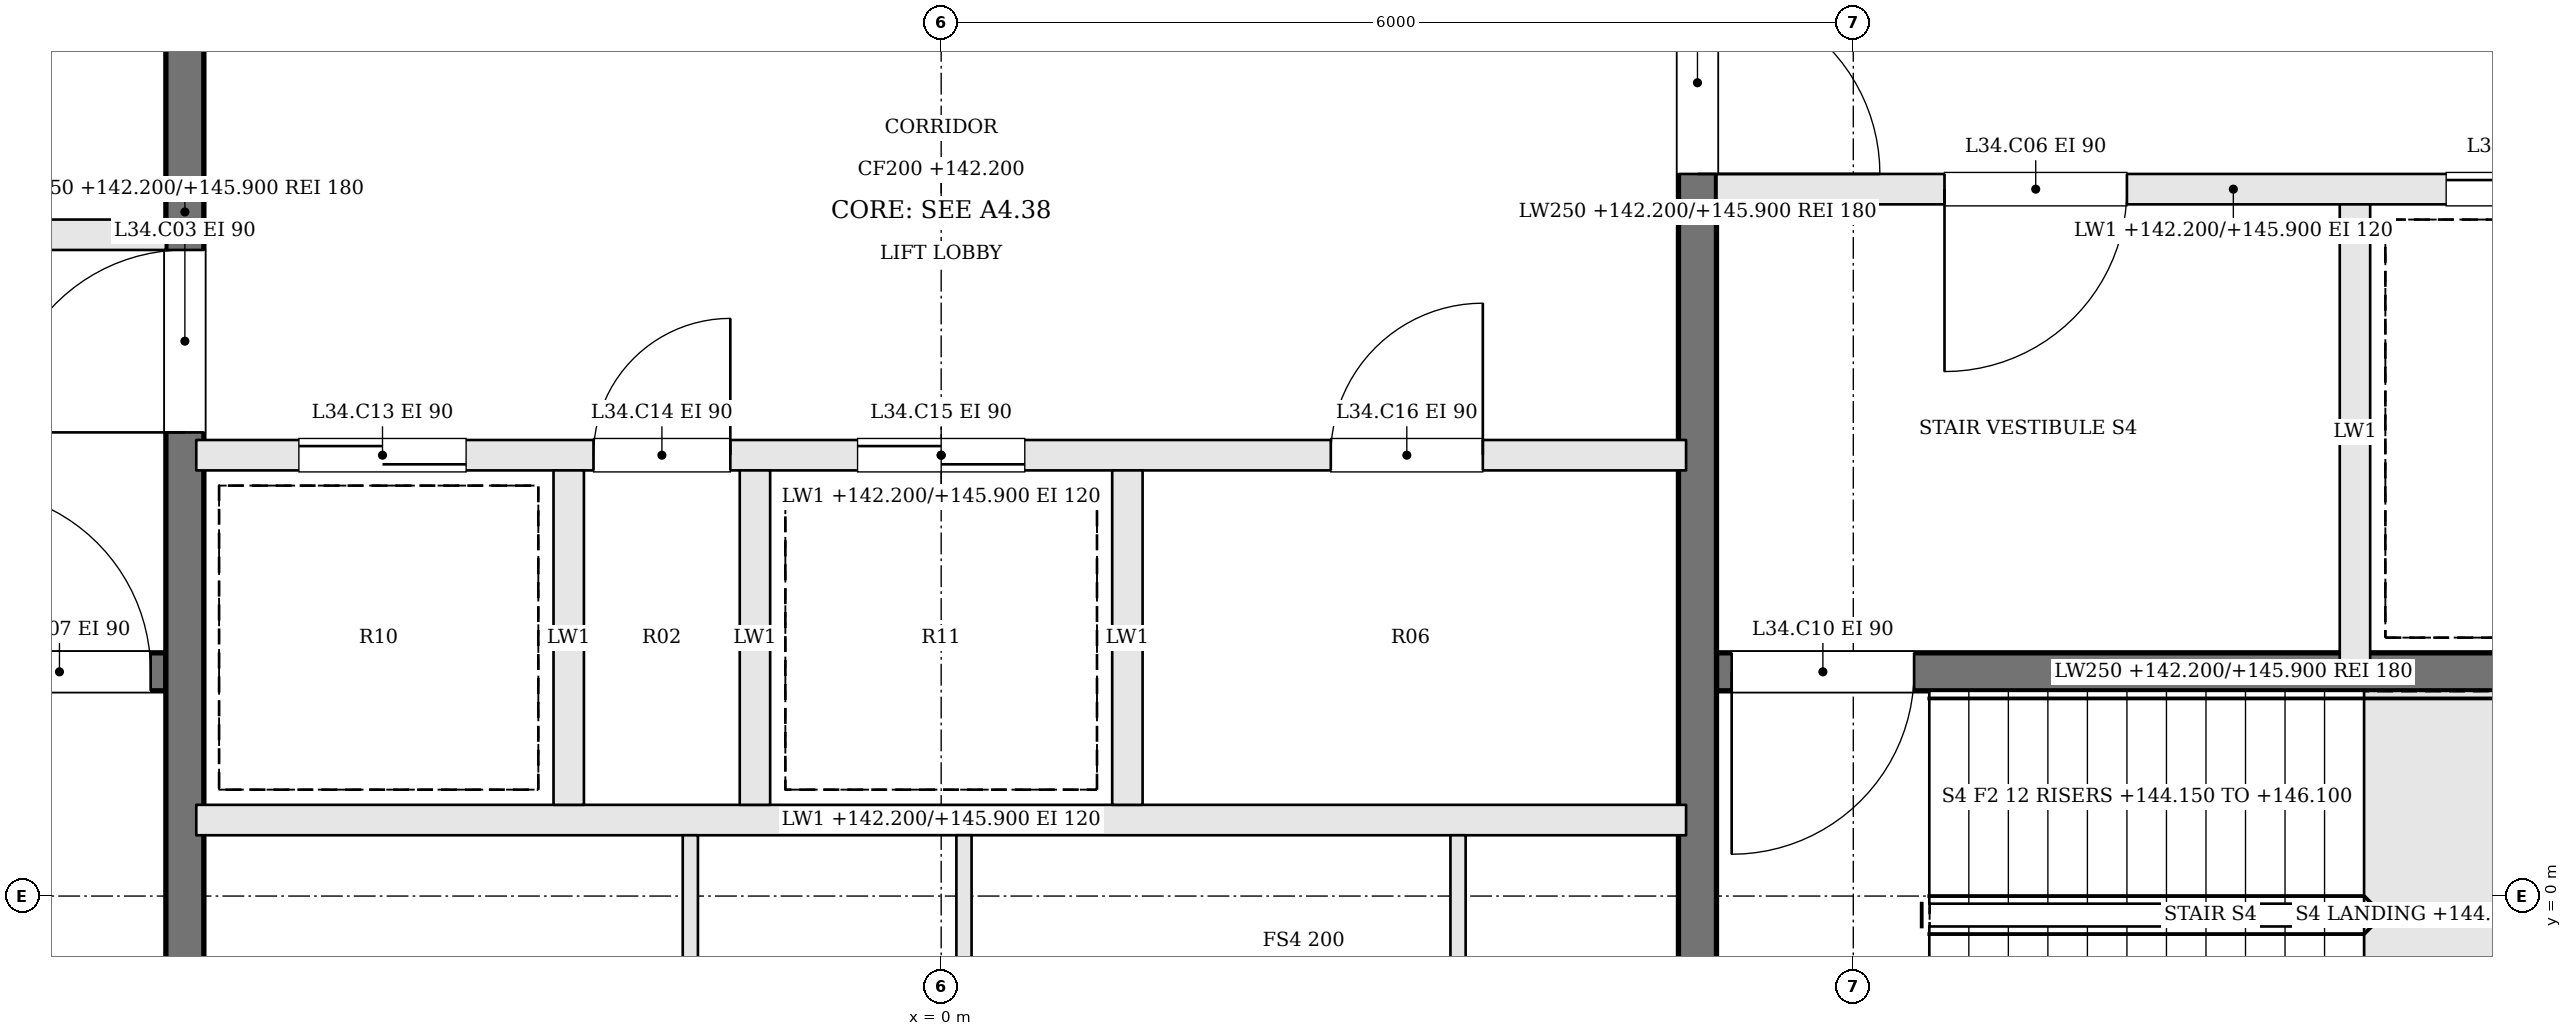
"""IFC4 building model, lengths in metres.
Left out: names, types, materials, properties, quantities, classifications, styles, units other than length and angle.
Written with IfcOpenShell. Run it as: python <this file> out.ifc"""

import sys

from ifc_helpers import new_model, si_unit, direction, frame, frame_2d, origin, place, context, subcontext, project, spatial, rectangle, extrude, element, fill, save


model = new_model("IFC4")
c1 = context("Model", 3, precision=1e-05, world=origin(), true_north=direction((0.0, 1.0)))
c2 = subcontext(c1, "Body", "Model", "MODEL_VIEW")
j1 = project(units=[si_unit("LENGTHUNIT", "METRE"), si_unit("PLANEANGLEUNIT", "RADIAN")], contexts=[c1])
p1 = place(None, origin())
s1 = spatial("IfcSite", under=j1, at=p1, CompositionType="ELEMENT")
p2 = place(p1, origin())
s2 = spatial("IfcBuilding", under=s1, at=p2, CompositionType="ELEMENT")
p3 = place(p2, frame((0.0, 0.0, 142.2)))
s3 = spatial("IfcBuildingStorey", under=s2, at=p3, CompositionType="ELEMENT", Elevation=142.2)
p4 = place(p3, frame((-11.9, 1.475, 0.0), z_axis=(0.0, 0.0, 1.0), x_axis=(1.0, 0.0, 0.0)))
e1 = element("IfcWall", 1, at=p4, inside=s3, PredefinedType="SOLIDWALL", context=c2, shape_type="SweptSolid", body=[
    extrude(rectangle(XDim=6.8, YDim=0.25, at=frame_2d((3.4, 0.0))), origin(), (0.0, 0.0, 1.0), 3.7),
])
p5 = place(p4, frame((5.5, 0.0, 0.0)))
e2 = element("IfcOpeningElement", 2, at=p5, cuts=e1, PredefinedType="OPENING", context=c2, shape_type="SweptSolid", body=[
    extrude(rectangle(XDim=1.2, YDim=2.1, at=frame_2d((0.6, 1.05))), frame((0.0, 0.135, 0.0), z_axis=(0.0, -1.0, 0.0), x_axis=(1.0, 0.0, 0.0)), (0.0, 0.0, 1.0), 0.27),
])
p6 = place(p3, frame((-11.9, 4.35, 0.0), z_axis=(0.0, 0.0, 1.0), x_axis=(1.0, 0.0, 0.0)))
e3 = element("IfcWall", 3, at=p6, inside=s3, PredefinedType="SOLIDWALL", context=c2, shape_type="SweptSolid", body=[
    extrude(rectangle(XDim=6.8, YDim=0.2, at=frame_2d((3.4, 0.0))), origin(), (0.0, 0.0, 1.0), 3.7),
])
p7 = place(p6, frame((4.1, 0.0, 0.0)))
e4 = element("IfcOpeningElement", 4, at=p7, cuts=e3, PredefinedType="OPENING", context=c2, shape_type="SweptSolid", body=[
    extrude(rectangle(XDim=1.2, YDim=2.1, at=frame_2d((0.6, 1.05))), frame((0.0, 0.11, 0.0), z_axis=(0.0, -1.0, 0.0), x_axis=(1.0, 0.0, 0.0)), (0.0, 0.0, 1.0), 0.22),
])
p8 = place(p6, frame((0.8, 0.0, 0.0)))
e5 = element("IfcOpeningElement", 5, at=p8, cuts=e3, PredefinedType="OPENING", context=c2, shape_type="SweptSolid", body=[
    extrude(rectangle(XDim=1.2, YDim=2.1, at=frame_2d((0.6, 1.05))), frame((0.0, 0.11, 0.0), z_axis=(0.0, -1.0, 0.0), x_axis=(1.0, 0.0, 0.0)), (0.0, 0.0, 1.0), 0.22),
])
p9 = place(p3, frame((11.9, 4.65, 0.0), z_axis=(0.0, 0.0, 1.0), x_axis=(-1.0, 0.0, 0.0)))
e6 = element("IfcWall", 6, at=p9, inside=s3, PredefinedType="SOLIDWALL", context=c2, shape_type="SweptSolid", body=[
    extrude(rectangle(XDim=6.8, YDim=0.2, at=frame_2d((3.4, 0.0))), origin(), (0.0, 0.0, 1.0), 3.7),
])
p10 = place(p9, frame((4.1, 0.0, 0.0)))
e7 = element("IfcOpeningElement", 7, at=p10, cuts=e6, PredefinedType="OPENING", context=c2, shape_type="SweptSolid", body=[
    extrude(rectangle(XDim=1.2, YDim=2.1, at=frame_2d((0.6, 1.05))), frame((0.0, 0.11, 0.0), z_axis=(0.0, -1.0, 0.0), x_axis=(1.0, 0.0, 0.0)), (0.0, 0.0, 1.0), 0.22),
])
p11 = place(p9, frame((0.8, 0.0, 0.0)))
e8 = element("IfcOpeningElement", 8, at=p11, cuts=e6, PredefinedType="OPENING", context=c2, shape_type="SweptSolid", body=[
    extrude(rectangle(XDim=1.2, YDim=2.1, at=frame_2d((0.6, 1.05))), frame((0.0, 0.11, 0.0), z_axis=(0.0, -1.0, 0.0), x_axis=(1.0, 0.0, 0.0)), (0.0, 0.0, 1.0), 0.22),
])
p12 = place(p3, frame((11.9, 1.475, 0.0), z_axis=(0.0, 0.0, 1.0), x_axis=(-1.0, 0.0, 0.0)))
e9 = element("IfcWall", 9, at=p12, inside=s3, PredefinedType="SOLIDWALL", context=c2, shape_type="SweptSolid", body=[
    extrude(rectangle(XDim=6.8, YDim=0.25, at=frame_2d((3.4, 0.0))), origin(), (0.0, 0.0, 1.0), 3.7),
])
p13 = place(p12, frame((5.5, 0.0, 0.0)))
e10 = element("IfcOpeningElement", 10, at=p13, cuts=e9, PredefinedType="OPENING", context=c2, shape_type="SweptSolid", body=[
    extrude(rectangle(XDim=1.2, YDim=2.1, at=frame_2d((0.6, 1.05))), frame((0.0, 0.135, 0.0), z_axis=(0.0, -1.0, 0.0), x_axis=(1.0, 0.0, 0.0)), (0.0, 0.0, 1.0), 0.27),
])
p14 = place(p3, frame((9.3, 4.55, 0.0), z_axis=(0.0, 0.0, 1.0), x_axis=(0.0, -1.0, 0.0)))
e11 = element("IfcWall", 11, at=p14, inside=s3, PredefinedType="SOLIDWALL", context=c2, shape_type="SweptSolid", body=[
    extrude(rectangle(XDim=3.0, YDim=0.2, at=frame_2d((1.5, 0.0))), origin(), (0.0, 0.0, 1.0), 3.7),
])
p15 = place(p3, frame((-4.975, -1.9, 0.0), z_axis=(0.0, 0.0, 1.0), x_axis=(0.0, 1.0, 0.0)))
e12 = element("IfcWall", 12, at=p15, inside=s3, PredefinedType="SOLIDWALL", context=c2, shape_type="SweptSolid", body=[
    extrude(rectangle(XDim=12.8, YDim=0.25, at=frame_2d((6.4, 0.0))), origin(), (0.0, 0.0, 1.0), 3.7),
])
p16 = place(p15, frame((4.95, 0.0, 0.0)))
e13 = element("IfcOpeningElement", 13, at=p16, cuts=e12, PredefinedType="OPENING", context=c2, shape_type="SweptSolid", body=[
    extrude(rectangle(XDim=1.2, YDim=2.1, at=frame_2d((0.6, 1.05))), frame((0.0, 0.135, 0.0), z_axis=(0.0, -1.0, 0.0), x_axis=(1.0, 0.0, 0.0)), (0.0, 0.0, 1.0), 0.27),
])
p17 = place(p3, frame((4.975, 10.9, 0.0), z_axis=(0.0, 0.0, 1.0), x_axis=(0.0, -1.0, 0.0)))
e14 = element("IfcWall", 14, at=p17, inside=s3, PredefinedType="SOLIDWALL", context=c2, shape_type="SweptSolid", body=[
    extrude(rectangle(XDim=12.8, YDim=0.25, at=frame_2d((6.4, 0.0))), origin(), (0.0, 0.0, 1.0), 3.7),
])
p18 = place(p17, frame((4.95, 0.0, 0.0)))
e15 = element("IfcOpeningElement", 15, at=p18, cuts=e14, PredefinedType="OPENING", context=c2, shape_type="SweptSolid", body=[
    extrude(rectangle(XDim=1.2, YDim=2.1, at=frame_2d((0.6, 1.05))), frame((0.0, 0.135, 0.0), z_axis=(0.0, -1.0, 0.0), x_axis=(1.0, 0.0, 0.0)), (0.0, 0.0, 1.0), 0.27),
])
p19 = place(p3, frame((-4.9, 0.5, 0.0), z_axis=(0.0, 0.0, 1.0), x_axis=(1.0, 0.0, 0.0)))
e16 = element("IfcWall", 16, at=p19, inside=s3, PredefinedType="SOLIDWALL", context=c2, shape_type="SweptSolid", body=[
    extrude(rectangle(XDim=9.8, YDim=0.2, at=frame_2d((4.9, 0.0))), origin(), (0.0, 0.0, 1.0), 3.7),
])
p20 = place(p3, frame((-4.9, 2.9, 0.0), z_axis=(0.0, 0.0, 1.0), x_axis=(1.0, 0.0, 0.0)))
e17 = element("IfcWall", 17, at=p20, inside=s3, PredefinedType="SOLIDWALL", context=c2, shape_type="SweptSolid", body=[
    extrude(rectangle(XDim=9.8, YDim=0.2, at=frame_2d((4.9, 0.0))), origin(), (0.0, 0.0, 1.0), 3.7),
])
p21 = place(p20, frame((0.675, 0.0, 0.0)))
e18 = element("IfcOpeningElement", 18, at=p21, cuts=e17, PredefinedType="OPENING", context=c2, shape_type="SweptSolid", body=[
    extrude(rectangle(XDim=1.1, YDim=2.1, at=frame_2d((0.55, 1.05))), frame((0.0, 0.11, 0.0), z_axis=(0.0, -1.0, 0.0), x_axis=(1.0, 0.0, 0.0)), (0.0, 0.0, 1.0), 0.22),
])
p22 = place(p20, frame((2.613, 0.0, 0.0)))
e19 = element("IfcOpeningElement", 19, at=p22, cuts=e17, PredefinedType="OPENING", context=c2, shape_type="SweptSolid", body=[
    extrude(rectangle(XDim=0.9, YDim=2.1, at=frame_2d((0.45, 1.05))), frame((0.0, 0.11, 0.0), z_axis=(0.0, -1.0, 0.0), x_axis=(1.0, 0.0, 0.0)), (0.0, 0.0, 1.0), 0.22),
])
p23 = place(p20, frame((4.35, 0.0, 0.0)))
e20 = element("IfcOpeningElement", 20, at=p23, cuts=e17, PredefinedType="OPENING", context=c2, shape_type="SweptSolid", body=[
    extrude(rectangle(XDim=1.1, YDim=2.1, at=frame_2d((0.55, 1.05))), frame((0.0, 0.11, 0.0), z_axis=(0.0, -1.0, 0.0), x_axis=(1.0, 0.0, 0.0)), (0.0, 0.0, 1.0), 0.22),
])
p24 = place(p20, frame((7.463, 0.0, 0.0)))
e21 = element("IfcOpeningElement", 21, at=p24, cuts=e17, PredefinedType="OPENING", context=c2, shape_type="SweptSolid", body=[
    extrude(rectangle(XDim=1.0, YDim=2.1, at=frame_2d((0.5, 1.05))), frame((0.0, 0.11, 0.0), z_axis=(0.0, -1.0, 0.0), x_axis=(1.0, 0.0, 0.0)), (0.0, 0.0, 1.0), 0.22),
])
for number, where, z_axis, x_axis in (
    (22, (-2.45, 0.6, 0.0), (0.0, 0.0, 1.0), (0.0, 1.0, 0.0)),
    (23, (-1.225, 0.6, 0.0), (0.0, 0.0, 1.0), (0.0, 1.0, 0.0)),
    (24, (1.225, 0.6, 0.0), (0.0, 0.0, 1.0), (0.0, 1.0, 0.0)),
):
    element("IfcWall", number, at=place(p3, frame(where, z_axis=z_axis, x_axis=x_axis)), inside=s3, PredefinedType="SOLIDWALL", context=c2, shape_type="SweptSolid", body=[
        extrude(rectangle(XDim=2.2, YDim=0.2, at=frame_2d((1.1, 0.0))), origin(), (0.0, 0.0, 1.0), 3.7),
    ])
for number, where, z_axis, x_axis in (
    (25, (-1.65, -1.9, 0.0), (0.0, 0.0, 1.0), (0.0, 1.0, 0.0)),
    (26, (0.15, -1.9, 0.0), (0.0, 0.0, 1.0), (0.0, 1.0, 0.0)),
    (27, (3.4, -1.9, 0.0), (0.0, 0.0, 1.0), (0.0, 1.0, 0.0)),
):
    element("IfcWall", number, at=place(p3, frame(where, z_axis=z_axis, x_axis=x_axis)), inside=s3, PredefinedType="PARTITIONING", context=c2, shape_type="SweptSolid", body=[
        extrude(rectangle(XDim=2.3, YDim=0.1, at=frame_2d((1.15, 0.0))), origin(), (0.0, 0.0, 1.0), 3.7),
    ])
p25 = place(p16, origin())
e28 = element("IfcDoor", 28, at=p25, inside=s3, OperationType="SINGLE_SWING_LEFT", PredefinedType="DOOR", context=c2, shape_type="SweptSolid", body=[
    extrude(rectangle(XDim=1.2, YDim=2.1, at=frame_2d((0.6, 1.05))), frame((0.0, 0.025, 0.0), z_axis=(0.0, -1.0, 0.0), x_axis=(1.0, 0.0, 0.0)), (0.0, 0.0, 1.0), 0.05),
])
fill(e13, e28)
p26 = place(p18, origin())
e29 = element("IfcDoor", 29, at=p26, inside=s3, OperationType="SINGLE_SWING_RIGHT", PredefinedType="DOOR", context=c2, shape_type="SweptSolid", body=[
    extrude(rectangle(XDim=1.2, YDim=2.1, at=frame_2d((0.6, 1.05))), frame((0.0, 0.025, 0.0), z_axis=(0.0, -1.0, 0.0), x_axis=(1.0, 0.0, 0.0)), (0.0, 0.0, 1.0), 0.05),
])
fill(e15, e29)
p27 = place(p10, origin())
e30 = element("IfcDoor", 30, at=p27, inside=s3, OperationType="SINGLE_SWING_RIGHT", PredefinedType="DOOR", context=c2, shape_type="SweptSolid", body=[
    extrude(rectangle(XDim=1.2, YDim=2.1, at=frame_2d((0.6, 1.05))), frame((0.0, 0.025, 0.0), z_axis=(0.0, -1.0, 0.0), x_axis=(1.0, 0.0, 0.0)), (0.0, 0.0, 1.0), 0.05),
])
fill(e7, e30)
p28 = place(p5, origin())
e31 = element("IfcDoor", 31, at=p28, inside=s3, OperationType="SINGLE_SWING_LEFT", PredefinedType="DOOR", context=c2, shape_type="SweptSolid", body=[
    extrude(rectangle(XDim=1.2, YDim=2.1, at=frame_2d((0.6, 1.05))), frame((0.0, 0.025, 0.0), z_axis=(0.0, -1.0, 0.0), x_axis=(1.0, 0.0, 0.0)), (0.0, 0.0, 1.0), 0.05),
])
fill(e2, e31)
p29 = place(p13, origin())
e32 = element("IfcDoor", 32, at=p29, inside=s3, OperationType="SINGLE_SWING_RIGHT", PredefinedType="DOOR", context=c2, shape_type="SweptSolid", body=[
    extrude(rectangle(XDim=1.2, YDim=2.1, at=frame_2d((0.6, 1.05))), frame((0.0, 0.025, 0.0), z_axis=(0.0, -1.0, 0.0), x_axis=(1.0, 0.0, 0.0)), (0.0, 0.0, 1.0), 0.05),
])
fill(e10, e32)
p30 = place(p11, origin())
e33 = element("IfcDoor", 33, at=p30, inside=s3, OperationType="SLIDING_TO_RIGHT", PredefinedType="DOOR", context=c2, shape_type="SweptSolid", body=[
    extrude(rectangle(XDim=1.2, YDim=2.1, at=frame_2d((0.6, 1.05))), frame((0.0, 0.025, 0.0), z_axis=(0.0, -1.0, 0.0), x_axis=(1.0, 0.0, 0.0)), (0.0, 0.0, 1.0), 0.05),
])
fill(e8, e33)
p31 = place(p21, origin())
e34 = element("IfcDoor", 34, at=p31, inside=s3, OperationType="SLIDING_TO_RIGHT", PredefinedType="DOOR", context=c2, shape_type="SweptSolid", body=[
    extrude(rectangle(XDim=1.1, YDim=2.1, at=frame_2d((0.55, 1.05))), frame((0.0, 0.025, 0.0), z_axis=(0.0, -1.0, 0.0), x_axis=(1.0, 0.0, 0.0)), (0.0, 0.0, 1.0), 0.05),
])
fill(e18, e34)
p32 = place(p22, origin())
e35 = element("IfcDoor", 35, at=p32, inside=s3, OperationType="SINGLE_SWING_RIGHT", PredefinedType="DOOR", context=c2, shape_type="SweptSolid", body=[
    extrude(rectangle(XDim=0.9, YDim=2.1, at=frame_2d((0.45, 1.05))), frame((0.0, 0.025, 0.0), z_axis=(0.0, -1.0, 0.0), x_axis=(1.0, 0.0, 0.0)), (0.0, 0.0, 1.0), 0.05),
])
fill(e19, e35)
p33 = place(p23, origin())
e36 = element("IfcDoor", 36, at=p33, inside=s3, OperationType="SLIDING_TO_LEFT", PredefinedType="DOOR", context=c2, shape_type="SweptSolid", body=[
    extrude(rectangle(XDim=1.1, YDim=2.1, at=frame_2d((0.55, 1.05))), frame((0.0, 0.025, 0.0), z_axis=(0.0, -1.0, 0.0), x_axis=(1.0, 0.0, 0.0)), (0.0, 0.0, 1.0), 0.05),
])
fill(e20, e36)
p34 = place(p24, origin())
e37 = element("IfcDoor", 37, at=p34, inside=s3, OperationType="SINGLE_SWING_RIGHT", PredefinedType="DOOR", context=c2, shape_type="SweptSolid", body=[
    extrude(rectangle(XDim=1.0, YDim=2.1, at=frame_2d((0.5, 1.05))), frame((0.0, 0.025, 0.0), z_axis=(0.0, -1.0, 0.0), x_axis=(1.0, 0.0, 0.0)), (0.0, 0.0, 1.0), 0.05),
])
fill(e21, e37)
save(model, sys.argv[1])
